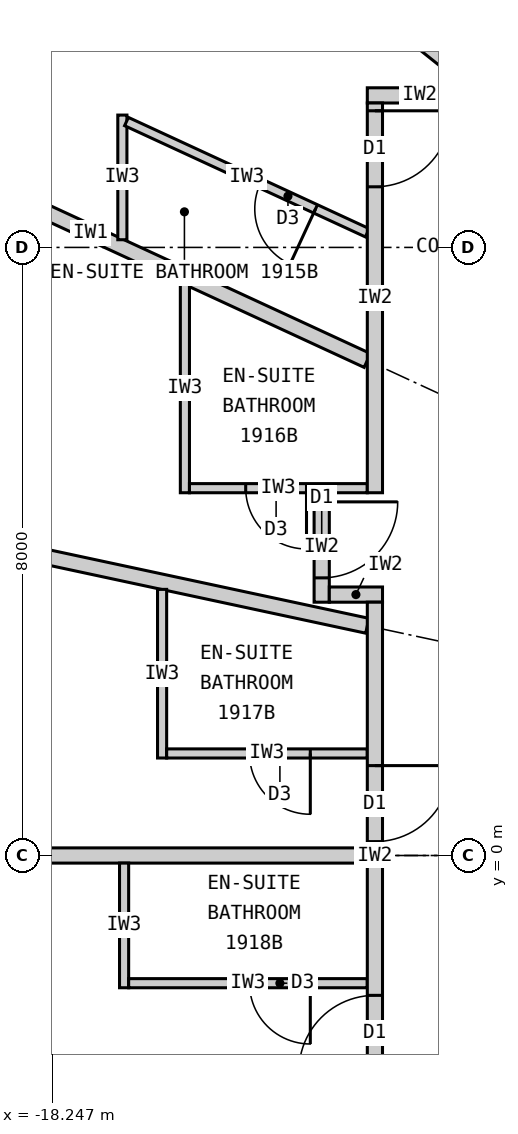
"""IFC4 building model, lengths in metres.
Left out: names, types, materials, properties, quantities, classifications, styles, units other than length and angle.
Written with IfcOpenShell. Run it as: python <this file> out.ifc"""

import sys

from ifc_helpers import new_model, si_unit, direction, frame, frame_2d, origin, place, context, subcontext, project, spatial, rectangle, extrude, element, fill, save


model = new_model("IFC4")
c1 = context("Model", 3, precision=1e-05, world=origin(), true_north=direction((0.0, 1.0)))
c2 = subcontext(c1, "Body", "Model", "MODEL_VIEW")
j1 = project(units=[si_unit("LENGTHUNIT", "METRE"), si_unit("PLANEANGLEUNIT", "RADIAN")], contexts=[c1])
p1 = place(None, origin())
s1 = spatial("IfcSite", under=j1, at=p1, CompositionType="ELEMENT")
p2 = place(p1, origin())
s2 = spatial("IfcBuilding", under=s1, at=p2, CompositionType="ELEMENT")
p3 = place(p2, frame((0.0, 0.0, 77.1)))
s3 = spatial("IfcBuildingStorey", under=s2, at=p3, CompositionType="ELEMENT", Elevation=77.1)
p4 = place(p3, frame((-12.625, 10.1, 0.0), z_axis=(0.0, 0.0, 1.0), x_axis=(-0.780892451574, 0.624665493744, 0.0)))
e1 = element("IfcWall", 1, at=p4, inside=s3, PredefinedType="PARTITIONING", context=c2, shape_type="SweptSolid", body=[
    extrude(rectangle(XDim=6.045, YDim=0.2, at=frame_2d((3.022, 0.0))), origin(), (0.0, 0.0, 1.0), 2.32),
])
p5 = place(p3, frame((-14.1, 6.512, 0.0), z_axis=(0.0, 0.0, 1.0), x_axis=(-0.907832871056, 0.419332181247, 0.0)))
e2 = element("IfcWall", 2, at=p5, inside=s3, PredefinedType="PARTITIONING", context=c2, shape_type="SweptSolid", body=[
    extrude(rectangle(XDim=8.023, YDim=0.2, at=frame_2d((4.011, 0.0))), origin(), (0.0, 0.0, 1.0), 2.32),
])
p6 = place(p3, frame((-14.1, 3.022, 0.0), z_axis=(0.0, 0.0, 1.0), x_axis=(-0.977790014929, 0.209586943072, 0.0)))
e3 = element("IfcWall", 3, at=p6, inside=s3, PredefinedType="PARTITIONING", context=c2, shape_type="SweptSolid", body=[
    extrude(rectangle(XDim=10.087, YDim=0.2, at=frame_2d((5.043, 0.0))), origin(), (0.0, 0.0, 1.0), 2.32),
])
p7 = place(p3, frame((-14.1, 0.0, 0.0), z_axis=(0.0, 0.0, 1.0), x_axis=(-1.0, 0.0, 0.0)))
e4 = element("IfcWall", 4, at=p7, inside=s3, PredefinedType="PARTITIONING", context=c2, shape_type="SweptSolid", body=[
    extrude(rectangle(XDim=10.75, YDim=0.2, at=frame_2d((5.375, 0.0))), origin(), (0.0, 0.0, 1.0), 2.27),
])
p8 = place(p3, frame((-17.323, 8.101, 0.0), z_axis=(0.0, 0.0, 1.0), x_axis=(0.0, 1.0, 0.0)))
e5 = element("IfcWall", 5, at=p8, inside=s3, PredefinedType="PARTITIONING", context=c2, shape_type="SweptSolid", body=[
    extrude(rectangle(XDim=1.64, YDim=0.12, at=frame_2d((0.82, 0.0))), origin(), (0.0, 0.0, 1.0), 3.12),
])
p9 = place(p3, frame((-14.1, 8.193, 0.0), z_axis=(0.0, 0.0, 1.0), x_axis=(-0.907836493557, 0.419324338628, 0.0)))
e6 = element("IfcWall", 6, at=p9, inside=s3, PredefinedType="PARTITIONING", context=c2, shape_type="SweptSolid", body=[
    extrude(rectangle(XDim=3.49, YDim=0.12, at=frame_2d((1.745, 0.0))), origin(), (0.0, 0.0, 1.0), 3.12),
])
p10 = place(p9, frame((0.75, 0.0, 0.0)))
e7 = element("IfcOpeningElement", 7, at=p10, cuts=e6, PredefinedType="OPENING", context=c2, shape_type="SweptSolid", body=[
    extrude(rectangle(XDim=0.8, YDim=2.1, at=frame_2d((0.4, 1.05))), frame((0.0, 0.07, 0.0), z_axis=(0.0, -1.0, 0.0), x_axis=(1.0, 0.0, 0.0)), (0.0, 0.0, 1.0), 0.14),
])
p11 = place(p3, frame((-16.5, 7.521, 0.0), z_axis=(0.0, 0.0, 1.0), x_axis=(0.0, -1.0, 0.0)))
e8 = element("IfcWall", 8, at=p11, inside=s3, PredefinedType="PARTITIONING", context=c2, shape_type="SweptSolid", body=[
    extrude(rectangle(XDim=2.749, YDim=0.12, at=frame_2d((1.374, 0.0))), origin(), (0.0, 0.0, 1.0), 3.12),
])
p12 = place(p3, frame((-14.1, 4.833, 0.0), z_axis=(0.0, 0.0, 1.0), x_axis=(-1.0, 0.0, 0.0)))
e9 = element("IfcWall", 9, at=p12, inside=s3, PredefinedType="PARTITIONING", context=c2, shape_type="SweptSolid", body=[
    extrude(rectangle(XDim=2.34, YDim=0.12, at=frame_2d((1.17, 0.0))), origin(), (0.0, 0.0, 1.0), 3.12),
])
p13 = place(p12, frame((0.8, 0.0, 0.0)))
e10 = element("IfcOpeningElement", 10, at=p13, cuts=e9, PredefinedType="OPENING", context=c2, shape_type="SweptSolid", body=[
    extrude(rectangle(XDim=0.8, YDim=2.1, at=frame_2d((0.4, 1.05))), frame((0.0, 0.07, 0.0), z_axis=(0.0, -1.0, 0.0), x_axis=(1.0, 0.0, 0.0)), (0.0, 0.0, 1.0), 0.14),
])
p14 = place(p3, frame((-16.8, 3.501, 0.0), z_axis=(0.0, 0.0, 1.0), x_axis=(0.0, -1.0, 0.0)))
e11 = element("IfcWall", 11, at=p14, inside=s3, PredefinedType="PARTITIONING", context=c2, shape_type="SweptSolid", body=[
    extrude(rectangle(XDim=2.219, YDim=0.12, at=frame_2d((1.109, 0.0))), origin(), (0.0, 0.0, 1.0), 3.12),
])
p15 = place(p3, frame((-14.1, 1.343, 0.0), z_axis=(0.0, 0.0, 1.0), x_axis=(-1.0, 0.0, 0.0)))
e12 = element("IfcWall", 12, at=p15, inside=s3, PredefinedType="PARTITIONING", context=c2, shape_type="SweptSolid", body=[
    extrude(rectangle(XDim=2.64, YDim=0.12, at=frame_2d((1.32, 0.0))), origin(), (0.0, 0.0, 1.0), 3.12),
])
p16 = place(p15, frame((0.75, 0.0, 0.0)))
e13 = element("IfcOpeningElement", 13, at=p16, cuts=e12, PredefinedType="OPENING", context=c2, shape_type="SweptSolid", body=[
    extrude(rectangle(XDim=0.8, YDim=2.1, at=frame_2d((0.4, 1.05))), frame((0.0, 0.07, 0.0), z_axis=(0.0, -1.0, 0.0), x_axis=(1.0, 0.0, 0.0)), (0.0, 0.0, 1.0), 0.14),
])
p17 = place(p3, frame((-17.3, -0.1, 0.0), z_axis=(0.0, 0.0, 1.0), x_axis=(0.0, -1.0, 0.0)))
e14 = element("IfcWall", 14, at=p17, inside=s3, PredefinedType="PARTITIONING", context=c2, shape_type="SweptSolid", body=[
    extrude(rectangle(XDim=1.64, YDim=0.12, at=frame_2d((0.82, 0.0))), origin(), (0.0, 0.0, 1.0), 3.12),
])
p18 = place(p3, frame((-14.1, -1.68, 0.0), z_axis=(0.0, 0.0, 1.0), x_axis=(-1.0, 0.0, 0.0)))
e15 = element("IfcWall", 15, at=p18, inside=s3, PredefinedType="PARTITIONING", context=c2, shape_type="SweptSolid", body=[
    extrude(rectangle(XDim=3.14, YDim=0.12, at=frame_2d((1.57, 0.0))), origin(), (0.0, 0.0, 1.0), 3.12),
])
p19 = place(p18, frame((0.75, 0.0, 0.0)))
e16 = element("IfcOpeningElement", 16, at=p19, cuts=e15, PredefinedType="OPENING", context=c2, shape_type="SweptSolid", body=[
    extrude(rectangle(XDim=0.8, YDim=2.1, at=frame_2d((0.4, 1.05))), frame((0.0, 0.07, 0.0), z_axis=(0.0, -1.0, 0.0), x_axis=(1.0, 0.0, 0.0)), (0.0, 0.0, 1.0), 0.14),
])
p20 = place(p3, frame((-14.7, 4.772, 0.0), z_axis=(0.0, 0.0, 1.0), x_axis=(0.0, -1.0, 0.0)))
e17 = element("IfcWall", 17, at=p20, inside=s3, PredefinedType="PARTITIONING", context=c2, shape_type="SweptSolid", body=[
    extrude(rectangle(XDim=1.44, YDim=0.2, at=frame_2d((0.72, 0.0))), origin(), (0.0, 0.0, 1.0), 3.12),
])
p21 = place(p20, frame((0.12, 0.0, 0.0)))
e18 = element("IfcOpeningElement", 18, at=p21, cuts=e17, PredefinedType="OPENING", context=c2, shape_type="SweptSolid", body=[
    extrude(rectangle(XDim=1.0, YDim=2.2, at=frame_2d((0.5, 1.1))), frame((0.0, 0.11, 0.0), z_axis=(0.0, -1.0, 0.0), x_axis=(1.0, 0.0, 0.0)), (0.0, 0.0, 1.0), 0.22),
])
p22 = place(p3, frame((-13.9, 3.433, 0.0), z_axis=(0.0, 0.0, 1.0), x_axis=(-1.0, 0.0, 0.0)))
e19 = element("IfcWall", 19, at=p22, inside=s3, PredefinedType="PARTITIONING", context=c2, shape_type="SweptSolid", body=[
    extrude(rectangle(XDim=0.7, YDim=0.2, at=frame_2d((0.35, 0.0))), origin(), (0.0, 0.0, 1.0), 2.32),
])
p23 = place(p3, frame((-14.1, 10.0, 0.0), z_axis=(0.0, 0.0, 1.0), x_axis=(1.0, 0.0, 0.0)))
e20 = element("IfcWall", 20, at=p23, inside=s3, PredefinedType="PARTITIONING", context=c2, shape_type="SweptSolid", body=[
    extrude(rectangle(XDim=2.481, YDim=0.2, at=frame_2d((1.24, 0.0))), origin(), (0.0, 0.0, 1.0), 3.12),
])
p24 = place(p3, frame((-14.0, 9.9, 0.0), z_axis=(0.0, 0.0, 1.0), x_axis=(0.0, -1.0, 0.0)))
e21 = element("IfcWall", 21, at=p24, inside=s3, PredefinedType="PARTITIONING", context=c2, shape_type="SweptSolid", body=[
    extrude(rectangle(XDim=5.127, YDim=0.2, at=frame_2d((2.564, 0.0))), origin(), (0.0, 0.0, 1.0), 3.12),
])
p25 = place(p24, frame((0.103, 0.0, 0.0)))
e22 = element("IfcOpeningElement", 22, at=p25, cuts=e21, PredefinedType="OPENING", context=c2, shape_type="SweptSolid", body=[
    extrude(rectangle(XDim=1.0, YDim=2.2, at=frame_2d((0.5, 1.1))), frame((0.0, 0.11, 0.0), z_axis=(0.0, -1.0, 0.0), x_axis=(1.0, 0.0, 0.0)), (0.0, 0.0, 1.0), 0.22),
])
p26 = place(p3, frame((-14.0, 3.333, 0.0), z_axis=(0.0, 0.0, 1.0), x_axis=(0.0, -1.0, 0.0)))
e23 = element("IfcWall", 23, at=p26, inside=s3, PredefinedType="PARTITIONING", context=c2, shape_type="SweptSolid", body=[
    extrude(rectangle(XDim=6.665, YDim=0.2, at=frame_2d((3.333, 0.0))), origin(), (0.0, 0.0, 1.0), 3.12),
])
p27 = place(p26, frame((2.15, 0.0, 0.0)))
e24 = element("IfcOpeningElement", 24, at=p27, cuts=e23, PredefinedType="OPENING", context=c2, shape_type="SweptSolid", body=[
    extrude(rectangle(XDim=1.0, YDim=2.2, at=frame_2d((0.5, 1.1))), frame((0.0, 0.11, 0.0), z_axis=(0.0, -1.0, 0.0), x_axis=(1.0, 0.0, 0.0)), (0.0, 0.0, 1.0), 0.22),
])
p28 = place(p26, frame((5.173, 0.0, 0.0)))
e25 = element("IfcOpeningElement", 25, at=p28, cuts=e23, PredefinedType="OPENING", context=c2, shape_type="SweptSolid", body=[
    extrude(rectangle(XDim=1.0, YDim=2.2, at=frame_2d((0.5, 1.1))), frame((0.0, 0.11, 0.0), z_axis=(0.0, -1.0, 0.0), x_axis=(1.0, 0.0, 0.0)), (0.0, 0.0, 1.0), 0.22),
])
p29 = place(p10, origin())
e26 = element("IfcDoor", 26, at=p29, inside=s3, OperationType="SINGLE_SWING_LEFT", PredefinedType="DOOR", context=c2, shape_type="SweptSolid", body=[
    extrude(rectangle(XDim=0.8, YDim=2.1, at=frame_2d((0.4, 1.05))), frame((0.0, 0.025, 0.0), z_axis=(0.0, -1.0, 0.0), x_axis=(1.0, 0.0, 0.0)), (0.0, 0.0, 1.0), 0.05),
])
fill(e7, e26)
p30 = place(p25, origin())
e27 = element("IfcDoor", 27, at=p30, inside=s3, OperationType="SINGLE_SWING_LEFT", PredefinedType="DOOR", context=c2, shape_type="SweptSolid", body=[
    extrude(rectangle(XDim=1.0, YDim=2.2, at=frame_2d((0.5, 1.1))), frame((0.0, 0.025, 0.0), z_axis=(0.0, -1.0, 0.0), x_axis=(1.0, 0.0, 0.0)), (0.0, 0.0, 1.0), 0.05),
])
fill(e22, e27)
p31 = place(p13, origin())
e28 = element("IfcDoor", 28, at=p31, inside=s3, OperationType="SINGLE_SWING_LEFT", PredefinedType="DOOR", context=c2, shape_type="SweptSolid", body=[
    extrude(rectangle(XDim=0.8, YDim=2.1, at=frame_2d((0.4, 1.05))), frame((0.0, 0.025, 0.0), z_axis=(0.0, -1.0, 0.0), x_axis=(1.0, 0.0, 0.0)), (0.0, 0.0, 1.0), 0.05),
])
fill(e10, e28)
p32 = place(p21, origin())
e29 = element("IfcDoor", 29, at=p32, inside=s3, OperationType="SINGLE_SWING_LEFT", PredefinedType="DOOR", context=c2, shape_type="SweptSolid", body=[
    extrude(rectangle(XDim=1.0, YDim=2.2, at=frame_2d((0.5, 1.1))), frame((0.0, 0.025, 0.0), z_axis=(0.0, -1.0, 0.0), x_axis=(1.0, 0.0, 0.0)), (0.0, 0.0, 1.0), 0.05),
])
fill(e18, e29)
p33 = place(p16, origin())
e30 = element("IfcDoor", 30, at=p33, inside=s3, OperationType="SINGLE_SWING_LEFT", PredefinedType="DOOR", context=c2, shape_type="SweptSolid", body=[
    extrude(rectangle(XDim=0.8, YDim=2.1, at=frame_2d((0.4, 1.05))), frame((0.0, 0.025, 0.0), z_axis=(0.0, -1.0, 0.0), x_axis=(1.0, 0.0, 0.0)), (0.0, 0.0, 1.0), 0.05),
])
fill(e13, e30)
p34 = place(p27, origin())
e31 = element("IfcDoor", 31, at=p34, inside=s3, OperationType="SINGLE_SWING_LEFT", PredefinedType="DOOR", context=c2, shape_type="SweptSolid", body=[
    extrude(rectangle(XDim=1.0, YDim=2.2, at=frame_2d((0.5, 1.1))), frame((0.0, 0.025, 0.0), z_axis=(0.0, -1.0, 0.0), x_axis=(1.0, 0.0, 0.0)), (0.0, 0.0, 1.0), 0.05),
])
fill(e24, e31)
p35 = place(p19, origin())
e32 = element("IfcDoor", 32, at=p35, inside=s3, OperationType="SINGLE_SWING_LEFT", PredefinedType="DOOR", context=c2, shape_type="SweptSolid", body=[
    extrude(rectangle(XDim=0.8, YDim=2.1, at=frame_2d((0.4, 1.05))), frame((0.0, 0.025, 0.0), z_axis=(0.0, -1.0, 0.0), x_axis=(1.0, 0.0, 0.0)), (0.0, 0.0, 1.0), 0.05),
])
fill(e16, e32)
p36 = place(p28, origin())
e33 = element("IfcDoor", 33, at=p36, inside=s3, OperationType="SINGLE_SWING_RIGHT", PredefinedType="DOOR", context=c2, shape_type="SweptSolid", body=[
    extrude(rectangle(XDim=1.0, YDim=2.2, at=frame_2d((0.5, 1.1))), frame((0.0, 0.025, 0.0), z_axis=(0.0, -1.0, 0.0), x_axis=(1.0, 0.0, 0.0)), (0.0, 0.0, 1.0), 0.05),
])
fill(e25, e33)
save(model, sys.argv[1])
